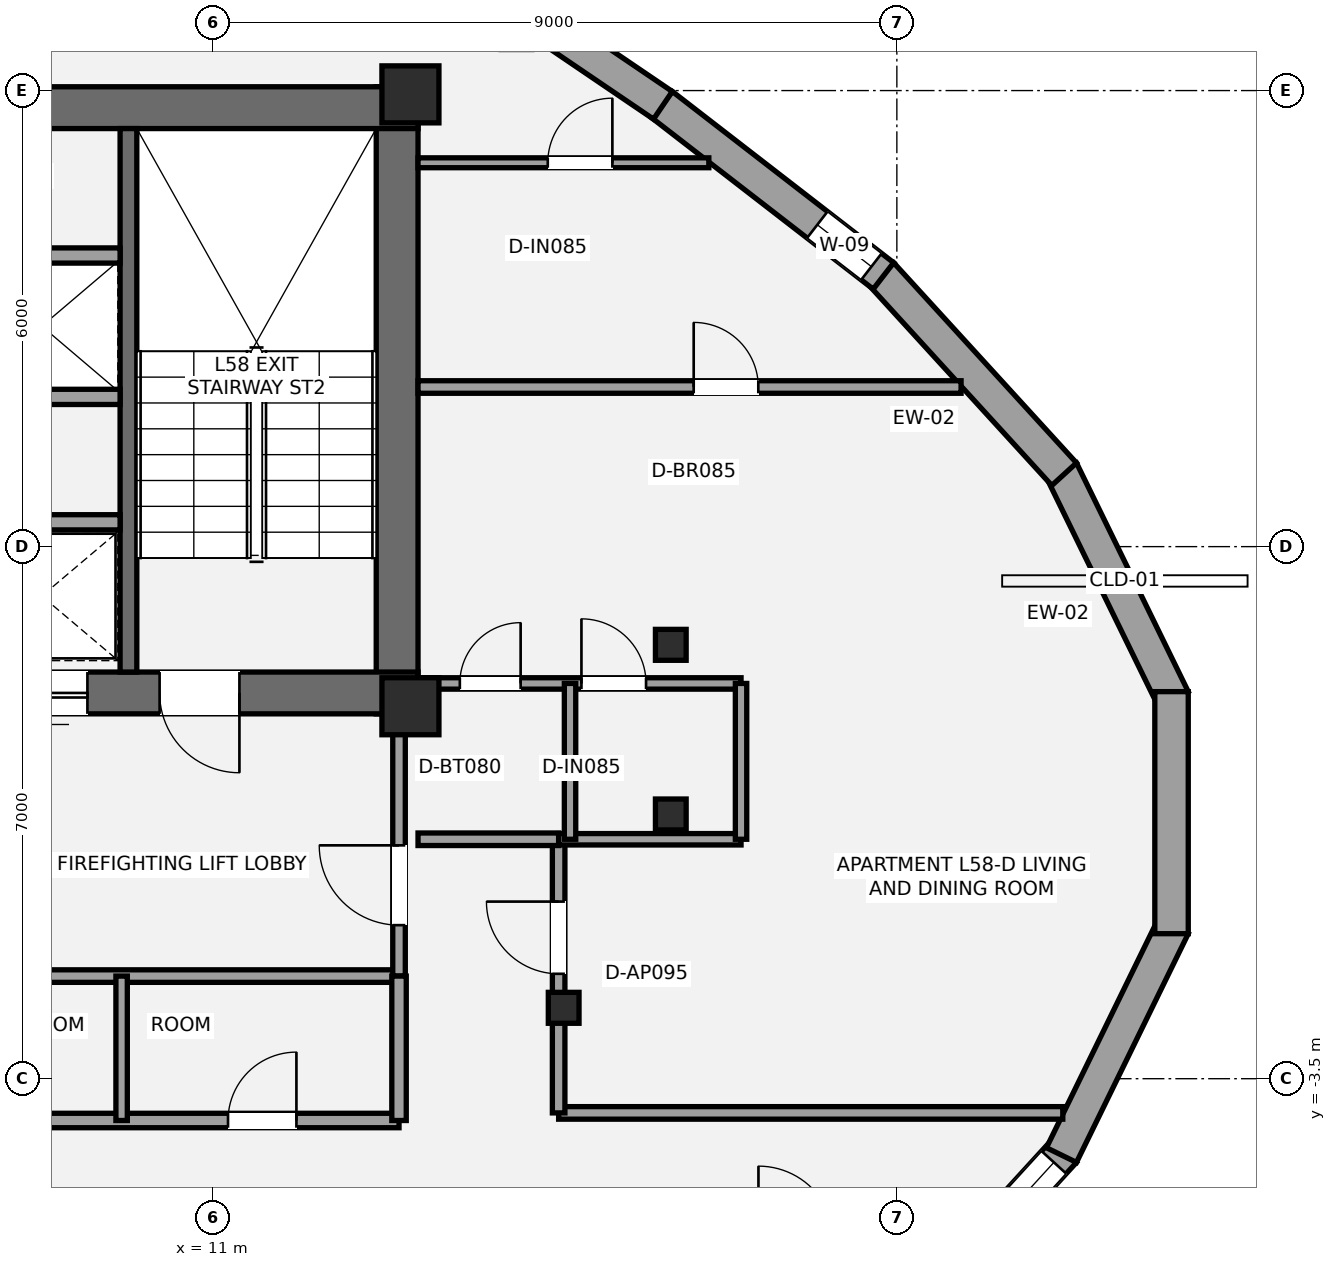
"""IFC4 building model, lengths in metres.
Left out: names, types, materials, properties, quantities, classifications, styles, units other than length and angle.
Written with IfcOpenShell. Run it as: python <this file> out.ifc"""

import sys

from ifc_helpers import new_model, si_unit, direction, frame, frame_2d, origin, origin_2d, place, context, subcontext, project, spatial, rectangle, i_section, extrude, element, fill, save


model = new_model("IFC4")
c1 = context("Model", 3, precision=1e-05, world=origin(), true_north=direction((0.0, 1.0)))
c2 = subcontext(c1, "Body", "Model", "MODEL_VIEW")
j1 = project(units=[si_unit("LENGTHUNIT", "METRE"), si_unit("PLANEANGLEUNIT", "RADIAN")], contexts=[c1])
p1 = place(None, origin())
s1 = spatial("IfcSite", under=j1, at=p1, CompositionType="ELEMENT")
p2 = place(p1, origin())
s2 = spatial("IfcBuilding", under=s1, at=p2, CompositionType="ELEMENT")
p3 = place(p2, frame((0.0, 0.0, 210.0)))
s3 = spatial("IfcBuildingStorey", under=s2, at=p3, CompositionType="ELEMENT", Elevation=210.0)
p4 = place(p3, frame((13.425, 1.3, 0.0), z_axis=(0.0, 0.0, 1.0), x_axis=(0.0, 1.0, 0.0)))
e1 = element("IfcWall", 1, at=p4, inside=s3, PredefinedType="SHEAR", context=c2, shape_type="SweptSolid", body=[
    extrude(rectangle(XDim=8.25, YDim=0.55, at=frame_2d((4.125, 0.0))), origin(), (0.0, 0.0, 1.0), 3.15),
])
p5 = place(p3, frame((4.525, 9.275, 0.0), z_axis=(0.0, 0.0, 1.0), x_axis=(1.0, 0.0, 0.0)))
e2 = element("IfcWall", 2, at=p5, inside=s3, PredefinedType="SHEAR", context=c2, shape_type="SweptSolid", body=[
    extrude(rectangle(XDim=9.175, YDim=0.55, at=frame_2d((4.587, 0.0))), origin(), (0.0, 0.0, 1.0), 3.15),
])
p6 = place(p3, frame((13.7, 1.575, 0.0), z_axis=(0.0, 0.0, 1.0), x_axis=(-1.0, 0.0, 0.0)))
e3 = element("IfcWall", 3, at=p6, inside=s3, PredefinedType="SHEAR", context=c2, shape_type="SweptSolid", body=[
    extrude(rectangle(XDim=8.775, YDim=0.55, at=frame_2d((4.387, 0.0))), origin(), (0.0, 0.0, 1.0), 3.15),
])
p7 = place(p6, frame((2.35, 0.0, 0.0)))
e4 = element("IfcOpeningElement", 4, at=p7, cuts=e3, PredefinedType="OPENING", context=c2, shape_type="SweptSolid", body=[
    extrude(rectangle(XDim=1.05, YDim=2.15, at=frame_2d((0.525, 1.075))), frame((0.0, 0.285, 0.0), z_axis=(0.0, -1.0, 0.0), x_axis=(1.0, 0.0, 0.0)), (0.0, 0.0, 1.0), 0.57),
])
p8 = place(p6, frame((4.35, 0.0, 0.0)))
e5 = element("IfcOpeningElement", 5, at=p8, cuts=e3, PredefinedType="OPENING", context=c2, shape_type="SweptSolid", body=[
    extrude(rectangle(XDim=1.1, YDim=2.2, at=frame_2d((0.55, 1.1))), frame((0.0, 0.285, 0.0), z_axis=(0.0, -1.0, 0.0), x_axis=(1.0, 0.0, 0.0)), (0.0, 0.0, 1.0), 0.57),
])
p9 = place(p3, frame((9.89, 1.85, 0.0), z_axis=(0.0, 0.0, 1.0), x_axis=(0.0, 1.0, 0.0)))
e6 = element("IfcWall", 6, at=p9, inside=s3, PredefinedType="SHEAR", context=c2, shape_type="SweptSolid", body=[
    extrude(rectangle(XDim=7.15, YDim=0.22, at=frame_2d((3.575, 0.0))), origin(), (0.0, 0.0, 1.0), 3.15),
])
for number, where, z_axis, x_axis in (
    (7, (13.6, 1.4, 0.0), (0.0, 0.0, 1.0), (1.0, 0.0, 0.0)),
    (8, (13.6, 9.45, 0.0), (0.0, 0.0, 1.0), (1.0, 0.0, 0.0)),
):
    element("IfcColumn", number, at=place(p3, frame(where, z_axis=z_axis, x_axis=x_axis)), inside=s3, PredefinedType="PILASTER", context=c2, shape_type="SweptSolid", body=[
        extrude(rectangle(XDim=0.75, YDim=0.75, at=origin_2d()), origin(), (0.0, 0.0, 1.0), 3.15),
    ])
for number, where, z_axis, x_axis in (
    (9, (17.026, 2.208, 0.0), (0.0, 0.0, 1.0), (1.0, 0.0, 0.0)),
    (10, (15.616, -2.567, 0.0), (0.0, 0.0, 1.0), (1.0, 0.0, 0.0)),
    (11, (17.026, -0.024, 0.0), (0.0, 0.0, 1.0), (1.0, 0.0, 0.0)),
):
    element("IfcColumn", number, at=place(p3, frame(where, z_axis=z_axis, x_axis=x_axis)), inside=s3, PredefinedType="COLUMN", context=c2, shape_type="SweptSolid", body=[
        extrude(i_section(OverallWidth=0.404, OverallDepth=0.407, WebThickness=0.027, FlangeThickness=0.044, at=origin_2d()), origin(), (0.0, 0.0, 1.0), 3.15),
    ])
p10 = place(p3, frame((22.166, 4.505, 0.0), z_axis=(0.0, 0.0, 1.0), x_axis=(0.439000922584, -0.898486610902, 0.0)))
e12 = element("IfcWall", 12, at=p10, inside=s3, PredefinedType="STANDARD", context=c2, shape_type="SweptSolid", body=[
    extrude(rectangle(XDim=3.349, YDim=0.44, at=frame_2d((1.675, 0.0))), origin(), (0.0, 0.0, 1.0), 2.336),
])
p11 = place(p3, frame((19.795, 7.087, 0.0), z_axis=(0.0, 0.0, 1.0), x_axis=(0.674353738675, -0.738408447362, 0.0)))
e13 = element("IfcWall", 13, at=p11, inside=s3, PredefinedType="STANDARD", context=c2, shape_type="SweptSolid", body=[
    extrude(rectangle(XDim=3.568, YDim=0.44, at=frame_2d((1.784, 0.0))), origin(), (0.0, 0.0, 1.0), 2.336),
])
p12 = place(p3, frame((16.911, 9.314, 0.0), z_axis=(0.0, 0.0, 1.0), x_axis=(0.791016617957, -0.61179466336, 0.0)))
e14 = element("IfcWall", 14, at=p12, inside=s3, PredefinedType="STANDARD", context=c2, shape_type="SweptSolid", body=[
    extrude(rectangle(XDim=3.682, YDim=0.44, at=frame_2d((1.841, 0.0))), origin(), (0.0, 0.0, 1.0), 2.336),
])
p13 = place(p12, frame((2.582, 0.0, 0.42)))
e15 = element("IfcOpeningElement", 15, at=p13, cuts=e14, PredefinedType="OPENING", context=c2, shape_type="SweptSolid", body=[
    extrude(rectangle(XDim=0.9, YDim=1.35, at=frame_2d((0.45, 0.675))), frame((0.0, 0.23, 0.0), z_axis=(0.0, -1.0, 0.0), x_axis=(1.0, 0.0, 0.0)), (0.0, 0.0, 1.0), 0.46),
])
p14 = place(p3, frame((13.865, 11.379, 0.0), z_axis=(0.0, 0.0, 1.0), x_axis=(0.827589832786, -0.561333295529, 0.0)))
e16 = element("IfcWall", 16, at=p14, inside=s3, PredefinedType="STANDARD", context=c2, shape_type="SweptSolid", body=[
    extrude(rectangle(XDim=3.693, YDim=0.44, at=frame_2d((1.847, 0.0))), origin(), (0.0, 0.0, 1.0), 2.336),
])
p15 = place(p14, frame((0.2, 0.0, 0.42)))
e17 = element("IfcOpeningElement", 17, at=p15, cuts=e16, PredefinedType="OPENING", context=c2, shape_type="SweptSolid", body=[
    extrude(rectangle(XDim=0.9, YDim=1.35, at=frame_2d((0.45, 0.675))), frame((0.0, 0.23, 0.0), z_axis=(0.0, -1.0, 0.0), x_axis=(1.0, 0.0, 0.0)), (0.0, 0.0, 1.0), 0.46),
])
p16 = place(p3, frame((22.201, -4.453, 0.0), z_axis=(0.0, 0.0, 1.0), x_axis=(-0.674353738675, -0.738408447362, 0.0)))
e18 = element("IfcWall", 18, at=p16, inside=s3, PredefinedType="STANDARD", context=c2, shape_type="SweptSolid", body=[
    extrude(rectangle(XDim=3.568, YDim=0.44, at=frame_2d((1.784, 0.0))), origin(), (0.0, 0.0, 1.0), 2.336),
])
p17 = place(p16, frame((0.2, 0.0, 0.42)))
e19 = element("IfcOpeningElement", 19, at=p17, cuts=e18, PredefinedType="OPENING", context=c2, shape_type="SweptSolid", body=[
    extrude(rectangle(XDim=0.9, YDim=1.35, at=frame_2d((0.45, 0.675))), frame((0.0, 0.23, 0.0), z_axis=(0.0, -1.0, 0.0), x_axis=(1.0, 0.0, 0.0)), (0.0, 0.0, 1.0), 0.46),
])
p18 = place(p3, frame((23.636, -1.496, 0.0), z_axis=(0.0, 0.0, 1.0), x_axis=(-0.439000922584, -0.898486610902, 0.0)))
e20 = element("IfcWall", 20, at=p18, inside=s3, PredefinedType="STANDARD", context=c2, shape_type="SweptSolid", body=[
    extrude(rectangle(XDim=3.349, YDim=0.44, at=frame_2d((1.675, 0.0))), origin(), (0.0, 0.0, 1.0), 2.336),
])
p19 = place(p3, frame((23.614, 1.592, 0.0), z_axis=(0.0, 0.0, 1.0), x_axis=(0.0, -1.0, 0.0)))
e21 = element("IfcWall", 21, at=p19, inside=s3, PredefinedType="STANDARD", context=c2, shape_type="SweptSolid", body=[
    extrude(rectangle(XDim=3.185, YDim=0.44, at=frame_2d((1.592, 0.0))), origin(), (0.0, 0.0, 1.0), 2.336),
])
p20 = place(p3, frame((7.2, -2.15, 0.0), z_axis=(0.0, 0.0, 1.0), x_axis=(1.0, 0.0, 0.0)))
e22 = element("IfcWall", 22, at=p20, inside=s3, PredefinedType="PARTITIONING", context=c2, shape_type="SweptSolid", body=[
    extrude(rectangle(XDim=6.25, YDim=0.165, at=frame_2d((3.125, 0.0))), origin(), (0.0, 0.0, 1.0), 2.97),
])
p21 = place(p3, frame((13.45, -2.15, 0.0), z_axis=(0.0, 0.0, 1.0), x_axis=(0.0, 1.0, 0.0)))
e23 = element("IfcWall", 23, at=p21, inside=s3, PredefinedType="PARTITIONING", context=c2, shape_type="SweptSolid", body=[
    extrude(rectangle(XDim=3.5, YDim=0.165, at=frame_2d((1.75, 0.0))), origin(), (0.0, 0.0, 1.0), 2.423),
])
p22 = place(p21, frame((0.67, 0.0, 0.0)))
e24 = element("IfcOpeningElement", 24, at=p22, cuts=e23, PredefinedType="OPENING", context=c2, shape_type="SweptSolid", body=[
    extrude(rectangle(XDim=1.05, YDim=2.15, at=frame_2d((0.525, 1.075))), frame((0.0, 0.093, 0.0), z_axis=(0.0, -1.0, 0.0), x_axis=(1.0, 0.0, 0.0)), (0.0, 0.0, 1.0), 0.185),
])
p23 = place(p3, frame((5.475, 3.82, 0.0), z_axis=(0.0, 0.0, 1.0), x_axis=(1.0, 0.0, 0.0)))
e25 = element("IfcWall", 25, at=p23, inside=s3, PredefinedType="SOLIDWALL", context=c2, shape_type="SweptSolid", body=[
    extrude(rectangle(XDim=4.305, YDim=0.2, at=frame_2d((2.152, 0.0))), origin(), (0.0, 0.0, 1.0), 2.97),
])
p24 = place(p23, frame((0.65, 0.0, 0.0)))
e26 = element("IfcOpeningElement", 26, at=p24, cuts=e25, PredefinedType="OPENING", context=c2, shape_type="SweptSolid", body=[
    extrude(rectangle(XDim=1.2, YDim=2.2, at=frame_2d((0.6, 1.1))), frame((0.0, 0.11, 0.0), z_axis=(0.0, -1.0, 0.0), x_axis=(1.0, 0.0, 0.0)), (0.0, 0.0, 1.0), 0.22),
])
for number, where, z_axis, x_axis in (
    (27, (5.475, 5.47, 0.0), (0.0, 0.0, 1.0), (1.0, 0.0, 0.0)),
    (28, (5.475, 7.33, 0.0), (0.0, 0.0, 1.0), (1.0, 0.0, 0.0)),
):
    element("IfcWall", number, at=place(p3, frame(where, z_axis=z_axis, x_axis=x_axis)), inside=s3, PredefinedType="SOLIDWALL", context=c2, shape_type="SweptSolid", body=[
        extrude(rectangle(XDim=4.305, YDim=0.2, at=frame_2d((2.152, 0.0))), origin(), (0.0, 0.0, 1.0), 2.97),
    ])
p25 = place(p3, frame((2.1, -4.05, 0.0), z_axis=(0.0, 0.0, 1.0), x_axis=(1.0, 0.0, 0.0)))
e29 = element("IfcWall", 29, at=p25, inside=s3, PredefinedType="PLUMBINGWALL", context=c2, shape_type="SweptSolid", body=[
    extrude(rectangle(XDim=11.35, YDim=0.19, at=frame_2d((5.675, 0.0))), origin(), (0.0, 0.0, 1.0), 2.357),
])
p26 = place(p25, frame((1.4, 0.0, 0.0)))
e30 = element("IfcOpeningElement", 30, at=p26, cuts=e29, PredefinedType="OPENING", context=c2, shape_type="SweptSolid", body=[
    extrude(rectangle(XDim=0.9, YDim=2.1, at=frame_2d((0.45, 1.05))), frame((0.0, 0.105, 0.0), z_axis=(0.0, -1.0, 0.0), x_axis=(1.0, 0.0, 0.0)), (0.0, 0.0, 1.0), 0.21),
])
p27 = place(p25, frame((5.3, 0.0, 0.0)))
e31 = element("IfcOpeningElement", 31, at=p27, cuts=e29, PredefinedType="OPENING", context=c2, shape_type="SweptSolid", body=[
    extrude(rectangle(XDim=0.9, YDim=2.1, at=frame_2d((0.45, 1.05))), frame((0.0, 0.105, 0.0), z_axis=(0.0, -1.0, 0.0), x_axis=(1.0, 0.0, 0.0)), (0.0, 0.0, 1.0), 0.21),
])
p28 = place(p25, frame((9.1, 0.0, 0.0)))
e32 = element("IfcOpeningElement", 32, at=p28, cuts=e29, PredefinedType="OPENING", context=c2, shape_type="SweptSolid", body=[
    extrude(rectangle(XDim=0.9, YDim=2.1, at=frame_2d((0.45, 1.05))), frame((0.0, 0.105, 0.0), z_axis=(0.0, -1.0, 0.0), x_axis=(1.0, 0.0, 0.0)), (0.0, 0.0, 1.0), 0.21),
])
p29 = place(p3, frame((13.45, -4.05, 0.0), z_axis=(0.0, 0.0, 1.0), x_axis=(0.0, 1.0, 0.0)))
e33 = element("IfcWall", 33, at=p29, inside=s3, PredefinedType="PLUMBINGWALL", context=c2, shape_type="SweptSolid", body=[
    extrude(rectangle(XDim=1.9, YDim=0.19, at=frame_2d((0.95, 0.0))), origin(), (0.0, 0.0, 1.0), 2.423),
])
p30 = place(p3, frame((9.8, -4.05, 0.0), z_axis=(0.0, 0.0, 1.0), x_axis=(0.0, 1.0, 0.0)))
e34 = element("IfcWall", 34, at=p30, inside=s3, PredefinedType="PLUMBINGWALL", context=c2, shape_type="SweptSolid", body=[
    extrude(rectangle(XDim=1.9, YDim=0.15, at=frame_2d((0.95, 0.0))), origin(), (0.0, 0.0, 1.0), 2.97),
])
p31 = place(p3, frame((15.55, -3.95, 0.0), z_axis=(0.0, 0.0, 1.0), x_axis=(1.0, 0.0, 0.0)))
e35 = element("IfcWall", 35, at=p31, inside=s3, PredefinedType="PARTITIONING", context=c2, shape_type="SweptSolid", body=[
    extrude(rectangle(XDim=6.633, YDim=0.165, at=frame_2d((3.316, 0.0))), origin(), (0.0, 0.0, 1.0), 2.423),
])
p32 = place(p3, frame((15.55, -3.95, 0.0), z_axis=(0.0, 0.0, 1.0), x_axis=(0.0, 1.0, 0.0)))
e36 = element("IfcWall", 36, at=p32, inside=s3, PredefinedType="PARTITIONING", context=c2, shape_type="SweptSolid", body=[
    extrude(rectangle(XDim=3.6, YDim=0.165, at=frame_2d((1.8, 0.0))), origin(), (0.0, 0.0, 1.0), 2.357),
])
p33 = place(p32, frame((1.83, 0.0, 0.0)))
e37 = element("IfcOpeningElement", 37, at=p33, cuts=e36, PredefinedType="OPENING", context=c2, shape_type="SweptSolid", body=[
    extrude(rectangle(XDim=0.95, YDim=2.15, at=frame_2d((0.475, 1.075))), frame((0.0, 0.093, 0.0), z_axis=(0.0, -1.0, 0.0), x_axis=(1.0, 0.0, 0.0)), (0.0, 0.0, 1.0), 0.185),
])
p34 = place(p3, frame((13.7, -0.35, 0.0), z_axis=(0.0, 0.0, 1.0), x_axis=(1.0, 0.0, 0.0)))
e38 = element("IfcWall", 38, at=p34, inside=s3, PredefinedType="PARTITIONING", context=c2, shape_type="SweptSolid", body=[
    extrude(rectangle(XDim=1.85, YDim=0.165, at=frame_2d((0.925, 0.0))), origin(), (0.0, 0.0, 1.0), 2.423),
])
p35 = place(p3, frame((13.7, 5.6, 0.0), z_axis=(0.0, 0.0, 1.0), x_axis=(1.0, 0.0, 0.0)))
e39 = element("IfcWall", 39, at=p35, inside=s3, PredefinedType="PARTITIONING", context=c2, shape_type="SweptSolid", body=[
    extrude(rectangle(XDim=7.145, YDim=0.165, at=frame_2d((3.572, 0.0))), origin(), (0.0, 0.0, 1.0), 2.423),
])
p36 = place(p35, frame((3.627, 0.0, 0.0)))
e40 = element("IfcOpeningElement", 40, at=p36, cuts=e39, PredefinedType="OPENING", context=c2, shape_type="SweptSolid", body=[
    extrude(rectangle(XDim=0.85, YDim=2.1, at=frame_2d((0.425, 1.05))), frame((0.0, 0.093, 0.0), z_axis=(0.0, -1.0, 0.0), x_axis=(1.0, 0.0, 0.0)), (0.0, 0.0, 1.0), 0.185),
])
p37 = place(p3, frame((13.7, 1.7, 0.0), z_axis=(0.0, 0.0, 1.0), x_axis=(1.0, 0.0, 0.0)))
e41 = element("IfcWall", 41, at=p37, inside=s3, PredefinedType="PLUMBINGWALL", context=c2, shape_type="SweptSolid", body=[
    extrude(rectangle(XDim=4.25, YDim=0.15, at=frame_2d((2.125, 0.0))), origin(), (0.0, 0.0, 1.0), 2.423),
])
p38 = place(p37, frame((0.55, 0.0, 0.0)))
e42 = element("IfcOpeningElement", 42, at=p38, cuts=e41, PredefinedType="OPENING", context=c2, shape_type="SweptSolid", body=[
    extrude(rectangle(XDim=0.8, YDim=2.1, at=frame_2d((0.4, 1.05))), frame((0.0, 0.085, 0.0), z_axis=(0.0, -1.0, 0.0), x_axis=(1.0, 0.0, 0.0)), (0.0, 0.0, 1.0), 0.17),
])
p39 = place(p37, frame((2.15, 0.0, 0.0)))
e43 = element("IfcOpeningElement", 43, at=p39, cuts=e41, PredefinedType="OPENING", context=c2, shape_type="SweptSolid", body=[
    extrude(rectangle(XDim=0.85, YDim=2.1, at=frame_2d((0.425, 1.05))), frame((0.0, 0.085, 0.0), z_axis=(0.0, -1.0, 0.0), x_axis=(1.0, 0.0, 0.0)), (0.0, 0.0, 1.0), 0.17),
])
p40 = place(p3, frame((15.55, -0.35, 0.0), z_axis=(0.0, 0.0, 1.0), x_axis=(1.0, 0.0, 0.0)))
e44 = element("IfcWall", 44, at=p40, inside=s3, PredefinedType="PLUMBINGWALL", context=c2, shape_type="SweptSolid", body=[
    extrude(rectangle(XDim=2.4, YDim=0.15, at=frame_2d((1.2, 0.0))), origin(), (0.0, 0.0, 1.0), 2.423),
])
for number, where, z_axis, x_axis in (
    (45, (15.7, -0.35, 0.0), (0.0, 0.0, 1.0), (0.0, 1.0, 0.0)),
    (46, (17.95, -0.35, 0.0), (0.0, 0.0, 1.0), (0.0, 1.0, 0.0)),
):
    element("IfcWall", number, at=place(p3, frame(where, z_axis=z_axis, x_axis=x_axis)), inside=s3, PredefinedType="PLUMBINGWALL", context=c2, shape_type="SweptSolid", body=[
        extrude(rectangle(XDim=2.05, YDim=0.15, at=frame_2d((1.025, 0.0))), origin(), (0.0, 0.0, 1.0), 2.97),
    ])
p41 = place(p3, frame((13.7, 8.55, 0.0), z_axis=(0.0, 0.0, 1.0), x_axis=(1.0, 0.0, 0.0)))
e47 = element("IfcWall", 47, at=p41, inside=s3, PredefinedType="PARTITIONING", context=c2, shape_type="SweptSolid", body=[
    extrude(rectangle(XDim=3.826, YDim=0.13, at=frame_2d((1.913, 0.0))), origin(), (0.0, 0.0, 1.0), 2.423),
])
p42 = place(p41, frame((1.707, 0.0, 0.0)))
e48 = element("IfcOpeningElement", 48, at=p42, cuts=e47, PredefinedType="OPENING", context=c2, shape_type="SweptSolid", body=[
    extrude(rectangle(XDim=0.85, YDim=2.1, at=frame_2d((0.425, 1.05))), frame((0.0, 0.075, 0.0), z_axis=(0.0, -1.0, 0.0), x_axis=(1.0, 0.0, 0.0)), (0.0, 0.0, 1.0), 0.15),
])
p43 = place(p13, origin())
e49 = element("IfcWindow", 49, at=p43, inside=s3, PartitioningType="SINGLE_PANEL", PredefinedType="WINDOW", context=c2, shape_type="SweptSolid", body=[
    extrude(rectangle(XDim=0.9, YDim=1.35, at=frame_2d((0.45, 0.675))), frame((0.0, -0.01, 0.0), z_axis=(0.0, -1.0, 0.0), x_axis=(1.0, 0.0, 0.0)), (0.0, 0.0, 1.0), 0.06),
])
fill(e15, e49)
p44 = place(p17, origin())
e50 = element("IfcWindow", 50, at=p44, inside=s3, PartitioningType="SINGLE_PANEL", PredefinedType="WINDOW", context=c2, shape_type="SweptSolid", body=[
    extrude(rectangle(XDim=0.9, YDim=1.35, at=frame_2d((0.45, 0.675))), frame((0.0, -0.01, 0.0), z_axis=(0.0, -1.0, 0.0), x_axis=(1.0, 0.0, 0.0)), (0.0, 0.0, 1.0), 0.06),
])
fill(e19, e50)
p45 = place(p7, origin())
e51 = element("IfcDoor", 51, at=p45, inside=s3, OperationType="SINGLE_SWING_LEFT", PredefinedType="DOOR", context=c2, shape_type="SweptSolid", body=[
    extrude(rectangle(XDim=1.05, YDim=2.15, at=frame_2d((0.525, 1.075))), frame((0.0, 0.025, 0.0), z_axis=(0.0, -1.0, 0.0), x_axis=(1.0, 0.0, 0.0)), (0.0, 0.0, 1.0), 0.05),
])
fill(e4, e51)
p46 = place(p22, origin())
e52 = element("IfcDoor", 52, at=p46, inside=s3, OperationType="SINGLE_SWING_RIGHT", PredefinedType="DOOR", context=c2, shape_type="SweptSolid", body=[
    extrude(rectangle(XDim=1.05, YDim=2.15, at=frame_2d((0.525, 1.075))), frame((0.0, 0.025, 0.0), z_axis=(0.0, -1.0, 0.0), x_axis=(1.0, 0.0, 0.0)), (0.0, 0.0, 1.0), 0.05),
])
fill(e24, e52)
p47 = place(p8, origin())
e53 = element("IfcDoor", 53, at=p47, inside=s3, OperationType="SLIDING_TO_LEFT", PredefinedType="DOOR", context=c2, shape_type="SweptSolid", body=[
    extrude(rectangle(XDim=1.1, YDim=2.2, at=frame_2d((0.55, 1.1))), frame((0.0, 0.025, 0.0), z_axis=(0.0, -1.0, 0.0), x_axis=(1.0, 0.0, 0.0)), (0.0, 0.0, 1.0), 0.05),
])
fill(e5, e53)
p48 = place(p28, origin())
e54 = element("IfcDoor", 54, at=p48, inside=s3, OperationType="SINGLE_SWING_RIGHT", PredefinedType="DOOR", context=c2, shape_type="SweptSolid", body=[
    extrude(rectangle(XDim=0.9, YDim=2.1, at=frame_2d((0.45, 1.05))), frame((0.0, 0.025, 0.0), z_axis=(0.0, -1.0, 0.0), x_axis=(1.0, 0.0, 0.0)), (0.0, 0.0, 1.0), 0.05),
])
fill(e32, e54)
p49 = place(p33, origin())
e55 = element("IfcDoor", 55, at=p49, inside=s3, OperationType="SINGLE_SWING_RIGHT", PredefinedType="DOOR", context=c2, shape_type="SweptSolid", body=[
    extrude(rectangle(XDim=0.95, YDim=2.15, at=frame_2d((0.475, 1.075))), frame((0.0, 0.025, 0.0), z_axis=(0.0, -1.0, 0.0), x_axis=(1.0, 0.0, 0.0)), (0.0, 0.0, 1.0), 0.05),
])
fill(e37, e55)
p50 = place(p38, origin())
e56 = element("IfcDoor", 56, at=p50, inside=s3, OperationType="SINGLE_SWING_RIGHT", PredefinedType="DOOR", context=c2, shape_type="SweptSolid", body=[
    extrude(rectangle(XDim=0.8, YDim=2.1, at=frame_2d((0.4, 1.05))), frame((0.0, 0.025, 0.0), z_axis=(0.0, -1.0, 0.0), x_axis=(1.0, 0.0, 0.0)), (0.0, 0.0, 1.0), 0.05),
])
fill(e42, e56)
p51 = place(p39, origin())
e57 = element("IfcDoor", 57, at=p51, inside=s3, OperationType="SINGLE_SWING_LEFT", PredefinedType="DOOR", context=c2, shape_type="SweptSolid", body=[
    extrude(rectangle(XDim=0.85, YDim=2.1, at=frame_2d((0.425, 1.05))), frame((0.0, 0.025, 0.0), z_axis=(0.0, -1.0, 0.0), x_axis=(1.0, 0.0, 0.0)), (0.0, 0.0, 1.0), 0.05),
])
fill(e43, e57)
p52 = place(p36, origin())
e58 = element("IfcDoor", 58, at=p52, inside=s3, OperationType="SINGLE_SWING_LEFT", PredefinedType="DOOR", context=c2, shape_type="SweptSolid", body=[
    extrude(rectangle(XDim=0.85, YDim=2.1, at=frame_2d((0.425, 1.05))), frame((0.0, 0.025, 0.0), z_axis=(0.0, -1.0, 0.0), x_axis=(1.0, 0.0, 0.0)), (0.0, 0.0, 1.0), 0.05),
])
fill(e40, e58)
p53 = place(p42, origin())
e59 = element("IfcDoor", 59, at=p53, inside=s3, OperationType="SINGLE_SWING_RIGHT", PredefinedType="DOOR", context=c2, shape_type="SweptSolid", body=[
    extrude(rectangle(XDim=0.85, YDim=2.1, at=frame_2d((0.425, 1.05))), frame((0.0, 0.025, 0.0), z_axis=(0.0, -1.0, 0.0), x_axis=(1.0, 0.0, 0.0)), (0.0, 0.0, 1.0), 0.05),
])
fill(e48, e59)
save(model, sys.argv[1])
